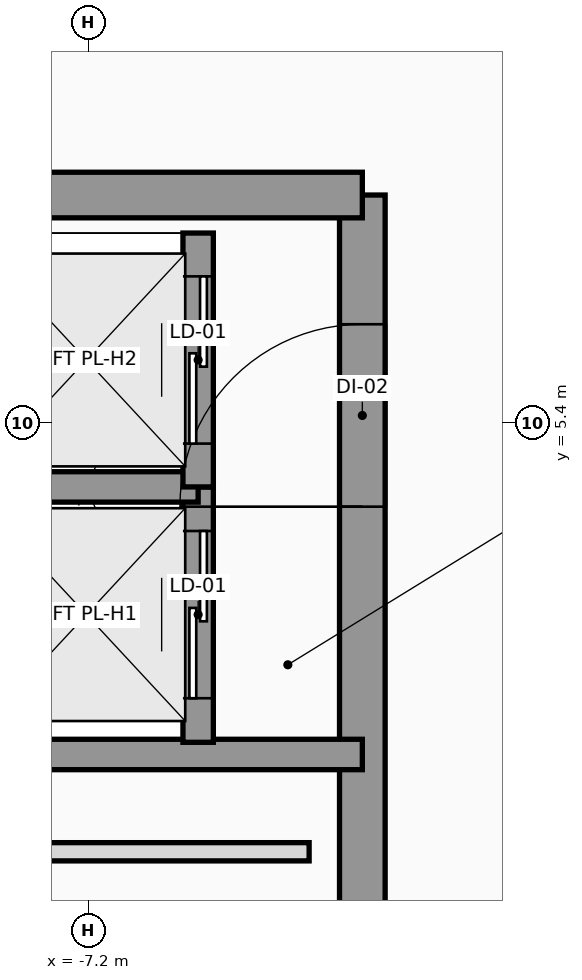
"""IFC4 building model, lengths in metres.
Left out: names, types, materials, properties, quantities, classifications, styles, units other than length and angle.
Written with IfcOpenShell. Run it as: python <this file> out.ifc"""

import sys

from ifc_helpers import new_model, si_unit, direction, frame, frame_2d, origin, place, context, subcontext, project, spatial, rectangle, extrude, source, transform, mapped, element, fill, save


model = new_model("IFC4")
c1 = context("Model", 3, precision=1e-05, world=origin(), true_north=direction((0.0, 1.0)))
c2 = subcontext(c1, "Body", "Model", "MODEL_VIEW")
j1 = project(units=[si_unit("LENGTHUNIT", "METRE"), si_unit("PLANEANGLEUNIT", "RADIAN")], contexts=[c1])
p1 = place(None, origin())
s1 = spatial("IfcSite", under=j1, at=p1, CompositionType="ELEMENT")
p2 = place(p1, origin())
s2 = spatial("IfcBuilding", under=s1, at=p2, CompositionType="ELEMENT")
p3 = place(p2, frame((0.0, 0.0, 223.6)))
s3 = spatial("IfcBuildingStorey", under=s2, at=p3, CompositionType="ELEMENT", Elevation=223.6)
p4 = place(p3, frame((-5.4, -5.6, 0.0), z_axis=(0.0, 0.0, 1.0), x_axis=(0.0, 1.0, 0.0)))
e1 = element("IfcWall", 1, at=p4, inside=s3, PredefinedType="SHEAR", context=c2, shape_type="SweptSolid", body=[
    extrude(rectangle(XDim=12.5, YDim=0.3, at=frame_2d((6.25, 0.0))), origin(), (0.0, 0.0, 1.0), 3.01),
])
p5 = place(p4, frame((4.55, 0.0, 0.0)))
e2 = element("IfcOpeningElement", 2, at=p5, cuts=e1, PredefinedType="OPENING", context=c2, shape_type="SweptSolid", body=[
    extrude(rectangle(XDim=1.2, YDim=2.2, at=frame_2d((0.6, 1.1))), frame((0.0, 0.16, 0.0), z_axis=(0.0, -1.0, 0.0), x_axis=(1.0, 0.0, 0.0)), (0.0, 0.0, 1.0), 0.32),
])
p6 = place(p4, frame((10.45, 0.0, 0.0)))
e3 = element("IfcOpeningElement", 3, at=p6, cuts=e1, PredefinedType="OPENING", context=c2, shape_type="SweptSolid", body=[
    extrude(rectangle(XDim=1.2, YDim=2.2, at=frame_2d((0.6, 1.1))), frame((0.0, 0.16, 0.0), z_axis=(0.0, -1.0, 0.0), x_axis=(1.0, 0.0, 0.0)), (0.0, 0.0, 1.0), 0.32),
])
p7 = place(p4, frame((6.86, 0.0, 0.0)))
e4 = element("IfcOpeningElement", 4, at=p7, cuts=e1, PredefinedType="OPENING", context=c2, shape_type="SweptSolid", body=[
    extrude(rectangle(XDim=0.8, YDim=2.1, at=frame_2d((0.4, 1.05))), frame((0.0, 0.16, 0.0), z_axis=(0.0, -1.0, 0.0), x_axis=(1.0, 0.0, 0.0)), (0.0, 0.0, 1.0), 0.32),
])
p8 = place(p3, frame((-11.356, 6.9, 0.0), z_axis=(0.0, 0.0, 1.0), x_axis=(1.0, 0.0, 0.0)))
e5 = element("IfcWall", 5, at=p8, inside=s3, PredefinedType="SHEAR", context=c2, shape_type="SweptSolid", body=[
    extrude(rectangle(XDim=5.956, YDim=0.3, at=frame_2d((2.978, 0.0))), origin(), (0.0, 0.0, 1.0), 3.01),
])
p9 = place(p3, frame((-8.18, 3.22, 0.0), z_axis=(0.0, 0.0, 1.0), x_axis=(1.0, 0.0, 0.0)))
e6 = element("IfcWall", 6, at=p9, inside=s3, PredefinedType="SOLIDWALL", context=c2, shape_type="SweptSolid", body=[
    extrude(rectangle(XDim=2.78, YDim=0.2, at=frame_2d((1.39, 0.0))), origin(), (0.0, 0.0, 1.0), 3.01),
])
p10 = place(p3, frame((-6.48, 3.3, 0.0), z_axis=(0.0, 0.0, 1.0), x_axis=(0.0, 1.0, 0.0)))
e7 = element("IfcWall", 7, at=p10, inside=s3, PredefinedType="SOLIDWALL", context=c2, shape_type="SweptSolid", body=[
    extrude(rectangle(XDim=1.68, YDim=0.2, at=frame_2d((0.84, 0.0))), origin(), (0.0, 0.0, 1.0), 3.01),
])
p11 = place(p10, frame((0.29, 0.0, 0.0)))
e8 = element("IfcOpeningElement", 8, at=p11, cuts=e7, PredefinedType="OPENING", context=c2, shape_type="SweptSolid", body=[
    extrude(rectangle(XDim=1.1, YDim=2.2, at=frame_2d((0.55, 1.1))), frame((0.0, 0.11, 0.0), z_axis=(0.0, -1.0, 0.0), x_axis=(1.0, 0.0, 0.0)), (0.0, 0.0, 1.0), 0.22),
])
p12 = place(p3, frame((-7.95, 4.98, 0.0), z_axis=(0.0, 0.0, 1.0), x_axis=(1.0, 0.0, 0.0)))
e9 = element("IfcWall", 9, at=p12, inside=s3, PredefinedType="SOLIDWALL", context=c2, shape_type="SweptSolid", body=[
    extrude(rectangle(XDim=1.47, YDim=0.2, at=frame_2d((0.735, 0.0))), origin(), (0.0, 0.0, 1.0), 3.01),
])
p13 = place(p3, frame((-6.48, 4.98, 0.0), z_axis=(0.0, 0.0, 1.0), x_axis=(0.0, 1.0, 0.0)))
e10 = element("IfcWall", 10, at=p13, inside=s3, PredefinedType="SOLIDWALL", context=c2, shape_type="SweptSolid", body=[
    extrude(rectangle(XDim=1.67, YDim=0.2, at=frame_2d((0.835, 0.0))), origin(), (0.0, 0.0, 1.0), 3.01),
])
p14 = place(p13, frame((0.285, 0.0, 0.0)))
e11 = element("IfcOpeningElement", 11, at=p14, cuts=e10, PredefinedType="OPENING", context=c2, shape_type="SweptSolid", body=[
    extrude(rectangle(XDim=1.1, YDim=2.2, at=frame_2d((0.55, 1.1))), frame((0.0, 0.11, 0.0), z_axis=(0.0, -1.0, 0.0), x_axis=(1.0, 0.0, 0.0)), (0.0, 0.0, 1.0), 0.22),
])
p15 = place(p3, frame((-8.14, 2.58, 0.0), z_axis=(0.0, 0.0, 1.0), x_axis=(1.0, 0.0, 0.0)))
e12 = element("IfcWall", 12, at=p15, inside=s3, PredefinedType="PARTITIONING", context=c2, shape_type="SweptSolid", body=[
    extrude(rectangle(XDim=2.39, YDim=0.12, at=frame_2d((1.195, 0.0))), origin(), (0.0, 0.0, 1.0), 3.01),
])
m1 = source(origin(), c2, "Body", "SweptSolid", [
    extrude(rectangle(XDim=1.2, YDim=2.2, at=frame_2d((0.6, 1.1))), frame((0.0, 0.025, 0.0), z_axis=(0.0, -1.0, 0.0), x_axis=(1.0, 0.0, 0.0)), (0.0, 0.0, 1.0), 0.05),
])
p16 = place(p6, origin())
e13 = element("IfcDoor", 13, at=p16, inside=s3, OperationType="SINGLE_SWING_LEFT", PredefinedType="DOOR", context=c2, shape_type="MappedRepresentation", body=[
    mapped(m1, transform((0.0, 0.0, 0.0), x_axis=(1.0, 0.0, 0.0), y_axis=(0.0, 1.0, 0.0), z_axis=(0.0, 0.0, 1.0), scale=1.0)),
])
fill(e3, e13)
m2 = source(origin(), c2, "Body", "SweptSolid", [
    extrude(rectangle(XDim=1.1, YDim=2.2, at=frame_2d((0.55, 1.1))), frame((0.0, 0.025, 0.0), z_axis=(0.0, -1.0, 0.0), x_axis=(1.0, 0.0, 0.0)), (0.0, 0.0, 1.0), 0.05),
])
p17 = place(p11, origin())
e14 = element("IfcDoor", 14, at=p17, inside=s3, OperationType="SLIDING_TO_LEFT", PredefinedType="DOOR", context=c2, shape_type="MappedRepresentation", body=[
    mapped(m2, transform((0.0, 0.0, 0.0), x_axis=(1.0, 0.0, 0.0), y_axis=(0.0, 1.0, 0.0), z_axis=(0.0, 0.0, 1.0), scale=1.0)),
])
fill(e8, e14)
p18 = place(p14, origin())
e15 = element("IfcDoor", 15, at=p18, inside=s3, OperationType="SLIDING_TO_LEFT", PredefinedType="DOOR", context=c2, shape_type="MappedRepresentation", body=[
    mapped(m2, transform((0.0, 0.0, 0.0), x_axis=(1.0, 0.0, 0.0), y_axis=(0.0, 1.0, 0.0), z_axis=(0.0, 0.0, 1.0), scale=1.0)),
])
fill(e11, e15)
save(model, sys.argv[1])
